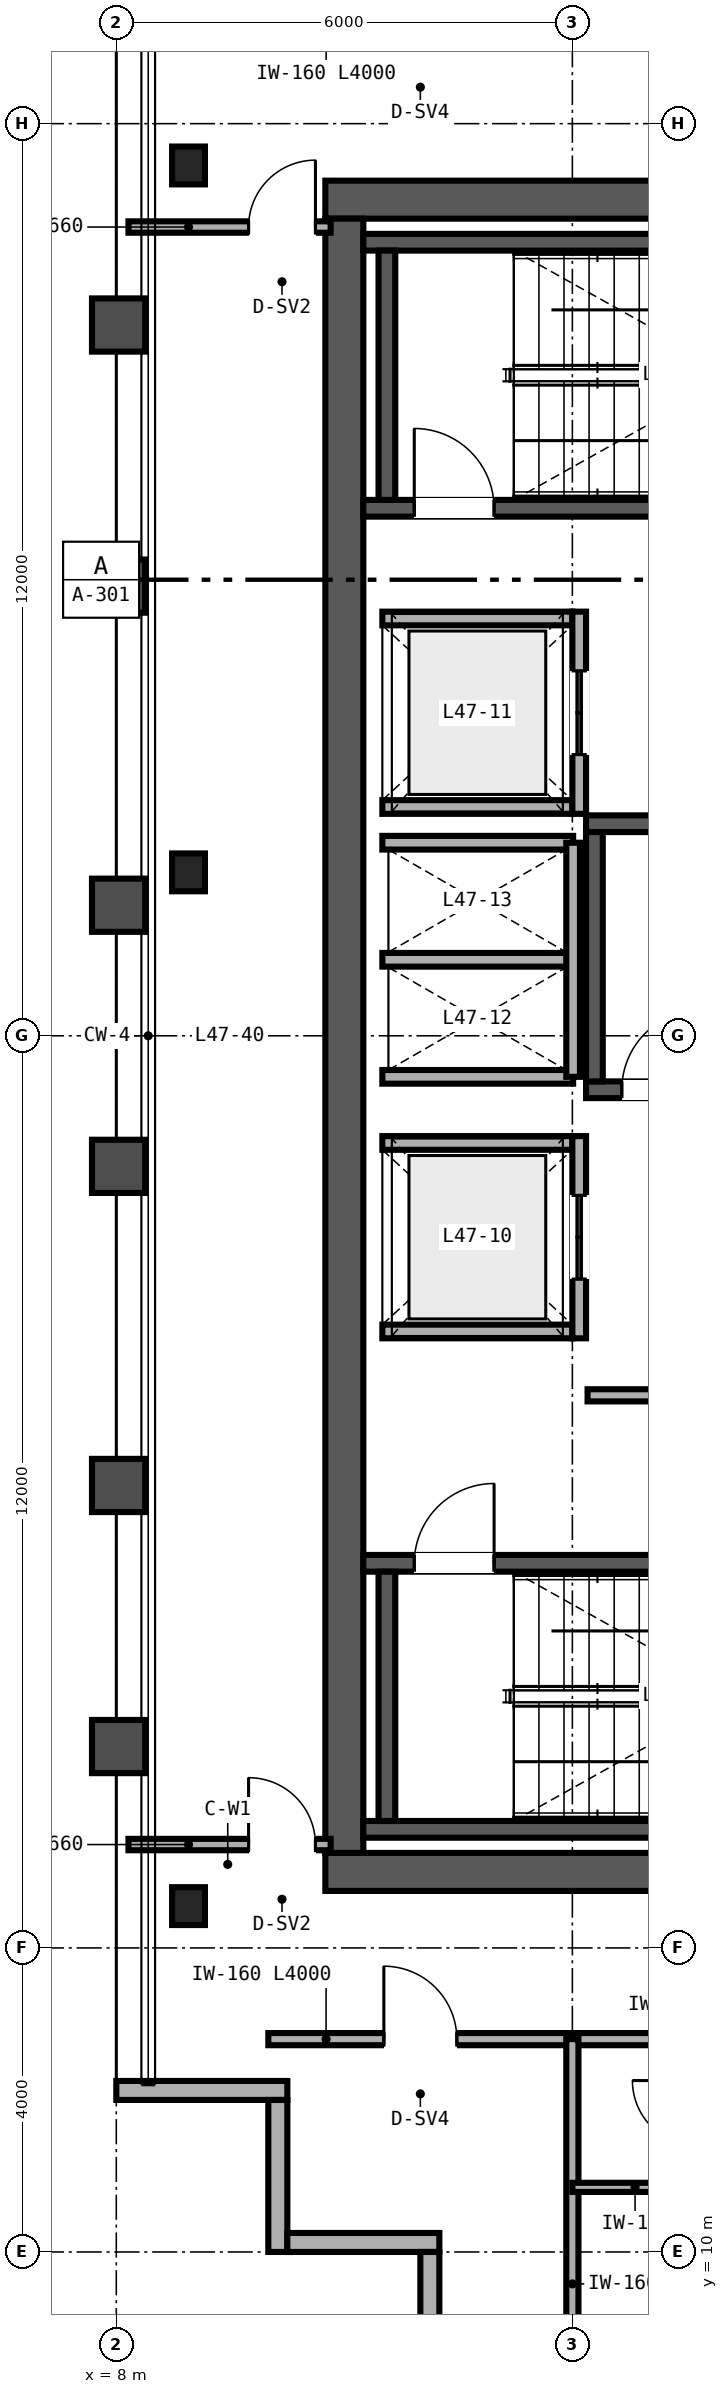
"""IFC4 building model, lengths in metres.
Left out: names, types, materials, properties, quantities, classifications, styles, units other than length and angle.
Written with IfcOpenShell. Run it as: python <this file> out.ifc"""

import sys

from ifc_helpers import new_model, si_unit, direction, frame, frame_2d, origin, origin_2d, place, context, subcontext, project, spatial, rectangle, i_section, extrude, source, transform, mapped, element, fill, save


model = new_model("IFC4")
c1 = context("Model", 3, precision=1e-05, world=origin(), true_north=direction((0.0, 1.0)))
c2 = subcontext(c1, "Body", "Model", "MODEL_VIEW")
j1 = project(units=[si_unit("LENGTHUNIT", "METRE"), si_unit("PLANEANGLEUNIT", "RADIAN")], contexts=[c1])
p1 = place(None, origin())
s1 = spatial("IfcSite", under=j1, at=p1, CompositionType="ELEMENT")
p2 = place(p1, origin())
s2 = spatial("IfcBuilding", under=s1, at=p2, CompositionType="ELEMENT")
p3 = place(p2, frame((0.0, 0.0, 188.4)))
s3 = spatial("IfcBuildingStorey", under=s2, at=p3, CompositionType="ELEMENT", Elevation=188.4)
p4 = place(p3, frame((10.75, 15.0, 0.0), z_axis=(0.0, 0.0, 1.0), x_axis=(1.0, 0.0, 0.0)))
e1 = element("IfcWall", 1, at=p4, inside=s3, PredefinedType="SHEAR", context=c2, shape_type="SweptSolid", body=[
    extrude(rectangle(XDim=12.5, YDim=0.5, at=frame_2d((6.25, 0.0))), origin(), (0.0, 0.0, 1.0), 3.37),
])
p5 = place(p4, frame((8.83, 0.0, 0.0)))
e2 = element("IfcOpeningElement", 2, at=p5, cuts=e1, PredefinedType="OPENING", context=c2, shape_type="SweptSolid", body=[
    extrude(rectangle(XDim=1.0, YDim=2.15, at=frame_2d((0.5, 1.075))), frame((0.0, 0.26, 0.0), z_axis=(0.0, -1.0, 0.0), x_axis=(1.0, 0.0, 0.0)), (0.0, 0.0, 1.0), 0.52),
])
p6 = place(p3, frame((10.75, 37.0, 0.0), z_axis=(0.0, 0.0, 1.0), x_axis=(1.0, 0.0, 0.0)))
e3 = element("IfcWall", 3, at=p6, inside=s3, PredefinedType="SHEAR", context=c2, shape_type="SweptSolid", body=[
    extrude(rectangle(XDim=12.5, YDim=0.5, at=frame_2d((6.25, 0.0))), origin(), (0.0, 0.0, 1.0), 3.37),
])
p7 = place(p6, frame((8.83, 0.0, 0.0)))
e4 = element("IfcOpeningElement", 4, at=p7, cuts=e3, PredefinedType="OPENING", context=c2, shape_type="SweptSolid", body=[
    extrude(rectangle(XDim=1.0, YDim=2.15, at=frame_2d((0.5, 1.075))), frame((0.0, 0.26, 0.0), z_axis=(0.0, -1.0, 0.0), x_axis=(1.0, 0.0, 0.0)), (0.0, 0.0, 1.0), 0.52),
])
p8 = place(p3, frame((11.0, 15.25, 0.0), z_axis=(0.0, 0.0, 1.0), x_axis=(0.0, 1.0, 0.0)))
e5 = element("IfcWall", 5, at=p8, inside=s3, PredefinedType="SHEAR", context=c2, shape_type="SweptSolid", body=[
    extrude(rectangle(XDim=21.5, YDim=0.5, at=frame_2d((10.75, 0.0))), origin(), (0.0, 0.0, 1.0), 3.37),
])
p9 = place(p3, frame((11.25, 15.56, 0.0), z_axis=(0.0, 0.0, 1.0), x_axis=(1.0, 0.0, 0.0)))
e6 = element("IfcWall", 6, at=p9, inside=s3, PredefinedType="SHEAR", context=c2, shape_type="SweptSolid", body=[
    extrude(rectangle(XDim=8.06, YDim=0.22, at=frame_2d((4.03, 0.0))), origin(), (0.0, 0.0, 1.0), 3.4),
])
p10 = place(p3, frame((11.25, 19.06, 0.0), z_axis=(0.0, 0.0, 1.0), x_axis=(1.0, 0.0, 0.0)))
e7 = element("IfcWall", 7, at=p10, inside=s3, PredefinedType="SHEAR", context=c2, shape_type="SweptSolid", body=[
    extrude(rectangle(XDim=8.06, YDim=0.22, at=frame_2d((4.03, 0.0))), origin(), (0.0, 0.0, 1.0), 3.4),
])
p11 = place(p10, frame((0.67, 0.0, 0.0)))
e8 = element("IfcOpeningElement", 8, at=p11, cuts=e7, PredefinedType="OPENING", context=c2, shape_type="SweptSolid", body=[
    extrude(rectangle(XDim=1.05, YDim=2.15, at=frame_2d((0.525, 1.075))), frame((0.0, 0.12, 0.0), z_axis=(0.0, -1.0, 0.0), x_axis=(1.0, 0.0, 0.0)), (0.0, 0.0, 1.0), 0.24),
])
p12 = place(p3, frame((11.56, 15.67, 0.0), z_axis=(0.0, 0.0, 1.0), x_axis=(0.0, 1.0, 0.0)))
e9 = element("IfcWall", 9, at=p12, inside=s3, PredefinedType="SHEAR", context=c2, shape_type="SweptSolid", body=[
    extrude(rectangle(XDim=3.28, YDim=0.22, at=frame_2d((1.64, 0.0))), origin(), (0.0, 0.0, 1.0), 3.4),
])
p13 = place(p3, frame((11.25, 32.94, 0.0), z_axis=(0.0, 0.0, 1.0), x_axis=(1.0, 0.0, 0.0)))
e10 = element("IfcWall", 10, at=p13, inside=s3, PredefinedType="SHEAR", context=c2, shape_type="SweptSolid", body=[
    extrude(rectangle(XDim=8.06, YDim=0.22, at=frame_2d((4.03, 0.0))), origin(), (0.0, 0.0, 1.0), 3.4),
])
p14 = place(p13, frame((0.67, 0.0, 0.0)))
e11 = element("IfcOpeningElement", 11, at=p14, cuts=e10, PredefinedType="OPENING", context=c2, shape_type="SweptSolid", body=[
    extrude(rectangle(XDim=1.05, YDim=2.15, at=frame_2d((0.525, 1.075))), frame((0.0, 0.12, 0.0), z_axis=(0.0, -1.0, 0.0), x_axis=(1.0, 0.0, 0.0)), (0.0, 0.0, 1.0), 0.24),
])
p15 = place(p3, frame((11.25, 36.44, 0.0), z_axis=(0.0, 0.0, 1.0), x_axis=(1.0, 0.0, 0.0)))
e12 = element("IfcWall", 12, at=p15, inside=s3, PredefinedType="SHEAR", context=c2, shape_type="SweptSolid", body=[
    extrude(rectangle(XDim=8.06, YDim=0.22, at=frame_2d((4.03, 0.0))), origin(), (0.0, 0.0, 1.0), 3.4),
])
p16 = place(p3, frame((11.56, 33.05, 0.0), z_axis=(0.0, 0.0, 1.0), x_axis=(0.0, 1.0, 0.0)))
e13 = element("IfcWall", 13, at=p16, inside=s3, PredefinedType="SHEAR", context=c2, shape_type="SweptSolid", body=[
    extrude(rectangle(XDim=3.28, YDim=0.22, at=frame_2d((1.64, 0.0))), origin(), (0.0, 0.0, 1.0), 3.4),
])
p17 = place(p3, frame((14.18, 25.29, 0.0), z_axis=(0.0, 0.0, 1.0), x_axis=(1.0, 0.0, 0.0)))
e14 = element("IfcWall", 14, at=p17, inside=s3, PredefinedType="SHEAR", context=c2, shape_type="SweptSolid", body=[
    extrude(rectangle(XDim=8.57, YDim=0.22, at=frame_2d((4.285, 0.0))), origin(), (0.0, 0.0, 1.0), 3.4),
])
p18 = place(p17, frame((0.47, 0.0, 0.0)))
e15 = element("IfcOpeningElement", 15, at=p18, cuts=e14, PredefinedType="OPENING", context=c2, shape_type="SweptSolid", body=[
    extrude(rectangle(XDim=1.05, YDim=2.15, at=frame_2d((0.525, 1.075))), frame((0.0, 0.12, 0.0), z_axis=(0.0, -1.0, 0.0), x_axis=(1.0, 0.0, 0.0)), (0.0, 0.0, 1.0), 0.24),
])
p19 = place(p3, frame((14.18, 28.79, 0.0), z_axis=(0.0, 0.0, 1.0), x_axis=(1.0, 0.0, 0.0)))
e16 = element("IfcWall", 16, at=p19, inside=s3, PredefinedType="SHEAR", context=c2, shape_type="SweptSolid", body=[
    extrude(rectangle(XDim=8.57, YDim=0.22, at=frame_2d((4.285, 0.0))), origin(), (0.0, 0.0, 1.0), 3.4),
])
p20 = place(p3, frame((14.29, 25.4, 0.0), z_axis=(0.0, 0.0, 1.0), x_axis=(0.0, 1.0, 0.0)))
e17 = element("IfcWall", 17, at=p20, inside=s3, PredefinedType="SHEAR", context=c2, shape_type="SweptSolid", body=[
    extrude(rectangle(XDim=3.28, YDim=0.22, at=frame_2d((1.64, 0.0))), origin(), (0.0, 0.0, 1.0), 3.4),
])
m1 = source(origin(), c2, "Body", "SweptSolid", [
    extrude(i_section(OverallWidth=0.432, OverallDepth=0.498, WebThickness=0.056, FlangeThickness=0.089, FilletRadius=0.025, at=origin_2d()), origin(), (0.0, 0.0, 1.0), 3.37),
])
for number, where, z_axis, x_axis in (
    (18, (8.95, 14.55, 0.0), (0.0, 0.0, 1.0), (1.0, 0.0, 0.0)),
    (19, (8.95, 28.15, 0.0), (0.0, 0.0, 1.0), (1.0, 0.0, 0.0)),
    (20, (8.95, 37.45, 0.0), (0.0, 0.0, 1.0), (1.0, 0.0, 0.0)),
):
    element("IfcColumn", number, at=place(p3, frame(where, z_axis=z_axis, x_axis=x_axis)), inside=s3, PredefinedType="COLUMN", context=c2, shape_type="MappedRepresentation", body=[
        mapped(m1, transform((0.0, 0.0, 0.0), scale=1.0)),
    ])
p21 = place(p3, frame((8.0, 12.125, 0.0), z_axis=(0.0, 0.0, 1.0), x_axis=(1.0, 0.0, 0.0)))
e21 = element("IfcWall", 21, at=p21, inside=s3, PredefinedType="SOLIDWALL", context=c2, shape_type="SweptSolid", body=[
    extrude(rectangle(XDim=2.25, YDim=0.25, at=frame_2d((1.125, 0.0))), origin(), (0.0, 0.0, 1.0), 3.37),
])
for number, where, z_axis, x_axis in (
    (22, (10.125, 12.0, 0.0), (0.0, 0.0, 1.0), (0.0, -1.0, 0.0)),
    (23, (10.25, 10.125, 0.0), (0.0, 0.0, 1.0), (1.0, 0.0, 0.0)),
    (24, (12.125, 10.0, 0.0), (0.0, 0.0, 1.0), (0.0, -1.0, 0.0)),
):
    element("IfcWall", number, at=place(p3, frame(where, z_axis=z_axis, x_axis=x_axis)), inside=s3, PredefinedType="SOLIDWALL", context=c2, shape_type="SweptSolid", body=[
        extrude(rectangle(XDim=2.0, YDim=0.25, at=frame_2d((1.0, 0.0))), origin(), (0.0, 0.0, 1.0), 3.37),
    ])
for number, where, z_axis, x_axis in (
    (25, (11.5, 22.11, 0.0), (0.0, 0.0, 1.0), (1.0, 0.0, 0.0)),
    (26, (11.5, 24.59, 0.0), (0.0, 0.0, 1.0), (1.0, 0.0, 0.0)),
):
    element("IfcWall", number, at=place(p3, frame(where, z_axis=z_axis, x_axis=x_axis)), inside=s3, PredefinedType="SOLIDWALL", context=c2, shape_type="SweptSolid", body=[
        extrude(rectangle(XDim=2.5, YDim=0.18, at=frame_2d((1.25, 0.0))), origin(), (0.0, 0.0, 1.0), 3.37),
    ])
p22 = place(p3, frame((14.09, 22.02, 0.0), z_axis=(0.0, 0.0, 1.0), x_axis=(0.0, 1.0, 0.0)))
e27 = element("IfcWall", 27, at=p22, inside=s3, PredefinedType="SOLIDWALL", context=c2, shape_type="SweptSolid", body=[
    extrude(rectangle(XDim=2.66, YDim=0.18, at=frame_2d((1.33, 0.0))), origin(), (0.0, 0.0, 1.0), 3.37),
])
p23 = place(p22, frame((0.78, 0.0, 0.0)))
e28 = element("IfcOpeningElement", 28, at=p23, cuts=e27, PredefinedType="OPENING", context=c2, shape_type="SweptSolid", body=[
    extrude(rectangle(XDim=1.1, YDim=2.2, at=frame_2d((0.55, 1.1))), frame((0.0, 0.1, 0.0), z_axis=(0.0, -1.0, 0.0), x_axis=(1.0, 0.0, 0.0)), (0.0, 0.0, 1.0), 0.2),
])
for number, where, z_axis, x_axis in (
    (29, (11.5, 29.01, 0.0), (0.0, 0.0, 1.0), (1.0, 0.0, 0.0)),
    (30, (11.5, 31.49, 0.0), (0.0, 0.0, 1.0), (1.0, 0.0, 0.0)),
):
    element("IfcWall", number, at=place(p3, frame(where, z_axis=z_axis, x_axis=x_axis)), inside=s3, PredefinedType="SOLIDWALL", context=c2, shape_type="SweptSolid", body=[
        extrude(rectangle(XDim=2.5, YDim=0.18, at=frame_2d((1.25, 0.0))), origin(), (0.0, 0.0, 1.0), 3.37),
    ])
p24 = place(p3, frame((14.09, 28.92, 0.0), z_axis=(0.0, 0.0, 1.0), x_axis=(0.0, 1.0, 0.0)))
e31 = element("IfcWall", 31, at=p24, inside=s3, PredefinedType="SOLIDWALL", context=c2, shape_type="SweptSolid", body=[
    extrude(rectangle(XDim=2.66, YDim=0.18, at=frame_2d((1.33, 0.0))), origin(), (0.0, 0.0, 1.0), 3.37),
])
p25 = place(p24, frame((0.78, 0.0, 0.0)))
e32 = element("IfcOpeningElement", 32, at=p25, cuts=e31, PredefinedType="OPENING", context=c2, shape_type="SweptSolid", body=[
    extrude(rectangle(XDim=1.1, YDim=2.2, at=frame_2d((0.55, 1.1))), frame((0.0, 0.1, 0.0), z_axis=(0.0, -1.0, 0.0), x_axis=(1.0, 0.0, 0.0)), (0.0, 0.0, 1.0), 0.2),
])
for number, where, z_axis, x_axis in (
    (33, (11.5, 25.46, 0.0), (0.0, 0.0, 1.0), (1.0, 0.0, 0.0)),
    (34, (11.5, 27.0, 0.0), (0.0, 0.0, 1.0), (1.0, 0.0, 0.0)),
    (35, (11.5, 28.54, 0.0), (0.0, 0.0, 1.0), (1.0, 0.0, 0.0)),
):
    element("IfcWall", number, at=place(p3, frame(where, z_axis=z_axis, x_axis=x_axis)), inside=s3, PredefinedType="SOLIDWALL", context=c2, shape_type="SweptSolid", body=[
        extrude(rectangle(XDim=2.51, YDim=0.18, at=frame_2d((1.255, 0.0))), origin(), (0.0, 0.0, 1.0), 3.37),
    ])
p26 = place(p3, frame((14.01, 25.46, 0.0), z_axis=(0.0, 0.0, 1.0), x_axis=(0.0, 1.0, 0.0)))
e36 = element("IfcWall", 36, at=p26, inside=s3, PredefinedType="SOLIDWALL", context=c2, shape_type="SweptSolid", body=[
    extrude(rectangle(XDim=3.08, YDim=0.18, at=frame_2d((1.54, 0.0))), origin(), (0.0, 0.0, 1.0), 3.37),
])
p27 = place(p3, frame((14.2, 21.27, 0.0), z_axis=(0.0, 0.0, 1.0), x_axis=(1.0, 0.0, 0.0)))
e37 = element("IfcWall", 37, at=p27, inside=s3, PredefinedType="PARTITIONING", context=c2, shape_type="SweptSolid", body=[
    extrude(rectangle(XDim=4.58, YDim=0.16, at=frame_2d((2.29, 0.0))), origin(), (0.0, 0.0, 1.0), 3.37),
])
p28 = place(p27, frame((1.8, 0.0, 0.0)))
e38 = element("IfcOpeningElement", 38, at=p28, cuts=e37, PredefinedType="OPENING", context=c2, shape_type="SweptSolid", body=[
    extrude(rectangle(XDim=1.0, YDim=2.15, at=frame_2d((0.5, 1.075))), frame((0.0, 0.09, 0.0), z_axis=(0.0, -1.0, 0.0), x_axis=(1.0, 0.0, 0.0)), (0.0, 0.0, 1.0), 0.18),
])
p29 = place(p3, frame((8.16, 15.36, 0.0), z_axis=(0.0, 0.0, 1.0), x_axis=(1.0, 0.0, 0.0)))
e39 = element("IfcWall", 39, at=p29, inside=s3, PredefinedType="PARTITIONING", context=c2, shape_type="SweptSolid", body=[
    extrude(rectangle(XDim=2.66, YDim=0.15, at=frame_2d((1.33, 0.0))), origin(), (0.0, 0.0, 1.0), 2.591),
])
p30 = place(p29, frame((1.58, 0.0, 0.0)))
e40 = element("IfcOpeningElement", 40, at=p30, cuts=e39, PredefinedType="OPENING", context=c2, shape_type="SweptSolid", body=[
    extrude(rectangle(XDim=0.88, YDim=2.15, at=frame_2d((0.44, 1.075))), frame((0.0, 0.085, 0.0), z_axis=(0.0, -1.0, 0.0), x_axis=(1.0, 0.0, 0.0)), (0.0, 0.0, 1.0), 0.17),
])
p31 = place(p3, frame((8.16, 36.64, 0.0), z_axis=(0.0, 0.0, 1.0), x_axis=(1.0, 0.0, 0.0)))
e41 = element("IfcWall", 41, at=p31, inside=s3, PredefinedType="PARTITIONING", context=c2, shape_type="SweptSolid", body=[
    extrude(rectangle(XDim=2.66, YDim=0.15, at=frame_2d((1.33, 0.0))), origin(), (0.0, 0.0, 1.0), 2.753),
])
p32 = place(p31, frame((1.58, 0.0, 0.0)))
e42 = element("IfcOpeningElement", 42, at=p32, cuts=e41, PredefinedType="OPENING", context=c2, shape_type="SweptSolid", body=[
    extrude(rectangle(XDim=0.88, YDim=2.15, at=frame_2d((0.44, 1.075))), frame((0.0, 0.085, 0.0), z_axis=(0.0, -1.0, 0.0), x_axis=(1.0, 0.0, 0.0)), (0.0, 0.0, 1.0), 0.17),
])
p33 = place(p3, frame((10.0, 12.8, 0.0), z_axis=(0.0, 0.0, 1.0), x_axis=(1.0, 0.0, 0.0)))
e43 = element("IfcWall", 43, at=p33, inside=s3, PredefinedType="PARTITIONING", context=c2, shape_type="SweptSolid", body=[
    extrude(rectangle(XDim=4.0, YDim=0.16, at=frame_2d((2.0, 0.0))), origin(), (0.0, 0.0, 1.0), 3.37),
])
p34 = place(p33, frame((1.52, 0.0, 0.0)))
e44 = element("IfcOpeningElement", 44, at=p34, cuts=e43, PredefinedType="OPENING", context=c2, shape_type="SweptSolid", body=[
    extrude(rectangle(XDim=0.96, YDim=2.15, at=frame_2d((0.48, 1.075))), frame((0.0, 0.09, 0.0), z_axis=(0.0, -1.0, 0.0), x_axis=(1.0, 0.0, 0.0)), (0.0, 0.0, 1.0), 0.18),
])
p35 = place(p3, frame((14.0, 12.8, 0.0), z_axis=(0.0, 0.0, 1.0), x_axis=(1.0, 0.0, 0.0)))
e45 = element("IfcWall", 45, at=p35, inside=s3, PredefinedType="PARTITIONING", context=c2, shape_type="SweptSolid", body=[
    extrude(rectangle(XDim=12.0, YDim=0.16, at=frame_2d((6.0, 0.0))), origin(), (0.0, 0.0, 1.0), 2.913),
])
p36 = place(p35, frame((4.54, 0.0, 0.0)))
e46 = element("IfcOpeningElement", 46, at=p36, cuts=e45, PredefinedType="OPENING", context=c2, shape_type="SweptSolid", body=[
    extrude(rectangle(XDim=0.94, YDim=2.15, at=frame_2d((0.47, 1.075))), frame((0.0, 0.09, 0.0), z_axis=(0.0, -1.0, 0.0), x_axis=(1.0, 0.0, 0.0)), (0.0, 0.0, 1.0), 0.18),
])
p37 = place(p35, frame((8.42, 0.0, 0.0)))
e47 = element("IfcOpeningElement", 47, at=p37, cuts=e45, PredefinedType="OPENING", context=c2, shape_type="SweptSolid", body=[
    extrude(rectangle(XDim=0.96, YDim=2.15, at=frame_2d((0.48, 1.075))), frame((0.0, 0.09, 0.0), z_axis=(0.0, -1.0, 0.0), x_axis=(1.0, 0.0, 0.0)), (0.0, 0.0, 1.0), 0.18),
])
p38 = place(p3, frame((14.0, 6.36, 0.0), z_axis=(0.0, 0.0, 1.0), x_axis=(0.0, 1.0, 0.0)))
e48 = element("IfcWall", 48, at=p38, inside=s3, PredefinedType="PARTITIONING", context=c2, shape_type="SweptSolid", body=[
    extrude(rectangle(XDim=6.44, YDim=0.16, at=frame_2d((3.22, 0.0))), origin(), (0.0, 0.0, 1.0), 2.677),
])
p39 = place(p3, frame((14.0, 10.85, 0.0), z_axis=(0.0, 0.0, 1.0), x_axis=(1.0, 0.0, 0.0)))
e49 = element("IfcWall", 49, at=p39, inside=s3, PredefinedType="PARTITIONING", context=c2, shape_type="SweptSolid", body=[
    extrude(rectangle(XDim=1.65, YDim=0.12, at=frame_2d((0.825, 0.0))), origin(), (0.0, 0.0, 1.0), 3.37),
])
m2 = source(origin(), c2, "Body", "SweptSolid", [
    extrude(rectangle(XDim=1.05, YDim=2.15, at=frame_2d((0.525, 1.075))), frame((0.0, 0.025, 0.0), z_axis=(0.0, -1.0, 0.0), x_axis=(1.0, 0.0, 0.0)), (0.0, 0.0, 1.0), 0.05),
])
p40 = place(p11, origin())
e50 = element("IfcDoor", 50, at=p40, inside=s3, OperationType="SINGLE_SWING_RIGHT", PredefinedType="DOOR", context=c2, shape_type="MappedRepresentation", body=[
    mapped(m2, transform((0.0, 0.0, 0.0), scale=1.0)),
])
fill(e8, e50)
p41 = place(p14, origin())
e51 = element("IfcDoor", 51, at=p41, inside=s3, OperationType="SINGLE_SWING_LEFT", PredefinedType="DOOR", context=c2, shape_type="MappedRepresentation", body=[
    mapped(m2, transform((0.0, 0.0, 0.0), scale=1.0)),
])
fill(e11, e51)
p42 = place(p18, origin())
e52 = element("IfcDoor", 52, at=p42, inside=s3, OperationType="SINGLE_SWING_RIGHT", PredefinedType="DOOR", context=c2, shape_type="MappedRepresentation", body=[
    mapped(m2, transform((0.0, 0.0, 0.0), scale=1.0)),
])
fill(e15, e52)
m3 = source(origin(), c2, "Body", "SweptSolid", [
    extrude(rectangle(XDim=1.1, YDim=2.2, at=frame_2d((0.55, 1.1))), frame((0.0, 0.025, 0.0), z_axis=(0.0, -1.0, 0.0), x_axis=(1.0, 0.0, 0.0)), (0.0, 0.0, 1.0), 0.05),
])
p43 = place(p23, origin())
e53 = element("IfcDoor", 53, at=p43, inside=s3, OperationType="DOUBLE_DOOR_SLIDING", PredefinedType="DOOR", context=c2, shape_type="MappedRepresentation", body=[
    mapped(m3, transform((0.0, 0.0, 0.0), scale=1.0)),
])
fill(e28, e53)
p44 = place(p25, origin())
e54 = element("IfcDoor", 54, at=p44, inside=s3, OperationType="DOUBLE_DOOR_SLIDING", PredefinedType="DOOR", context=c2, shape_type="MappedRepresentation", body=[
    mapped(m3, transform((0.0, 0.0, 0.0), scale=1.0)),
])
fill(e32, e54)
m4 = source(origin(), c2, "Body", "SweptSolid", [
    extrude(rectangle(XDim=0.88, YDim=2.15, at=frame_2d((0.44, 1.075))), frame((0.0, 0.025, 0.0), z_axis=(0.0, -1.0, 0.0), x_axis=(1.0, 0.0, 0.0)), (0.0, 0.0, 1.0), 0.05),
])
p45 = place(p30, origin())
e55 = element("IfcDoor", 55, at=p45, inside=s3, OperationType="SINGLE_SWING_LEFT", PredefinedType="DOOR", context=c2, shape_type="MappedRepresentation", body=[
    mapped(m4, transform((0.0, 0.0, 0.0), scale=1.0)),
])
fill(e40, e55)
p46 = place(p32, origin())
e56 = element("IfcDoor", 56, at=p46, inside=s3, OperationType="SINGLE_SWING_RIGHT", PredefinedType="DOOR", context=c2, shape_type="MappedRepresentation", body=[
    mapped(m4, transform((0.0, 0.0, 0.0), scale=1.0)),
])
fill(e42, e56)
m5 = source(origin(), c2, "Body", "SweptSolid", [
    extrude(rectangle(XDim=0.96, YDim=2.15, at=frame_2d((0.48, 1.075))), frame((0.0, 0.025, 0.0), z_axis=(0.0, -1.0, 0.0), x_axis=(1.0, 0.0, 0.0)), (0.0, 0.0, 1.0), 0.05),
])
p47 = place(p34, origin())
e57 = element("IfcDoor", 57, at=p47, inside=s3, OperationType="SINGLE_SWING_LEFT", PredefinedType="DOOR", context=c2, shape_type="MappedRepresentation", body=[
    mapped(m5, transform((0.0, 0.0, 0.0), scale=1.0)),
])
fill(e44, e57)
save(model, sys.argv[1])
